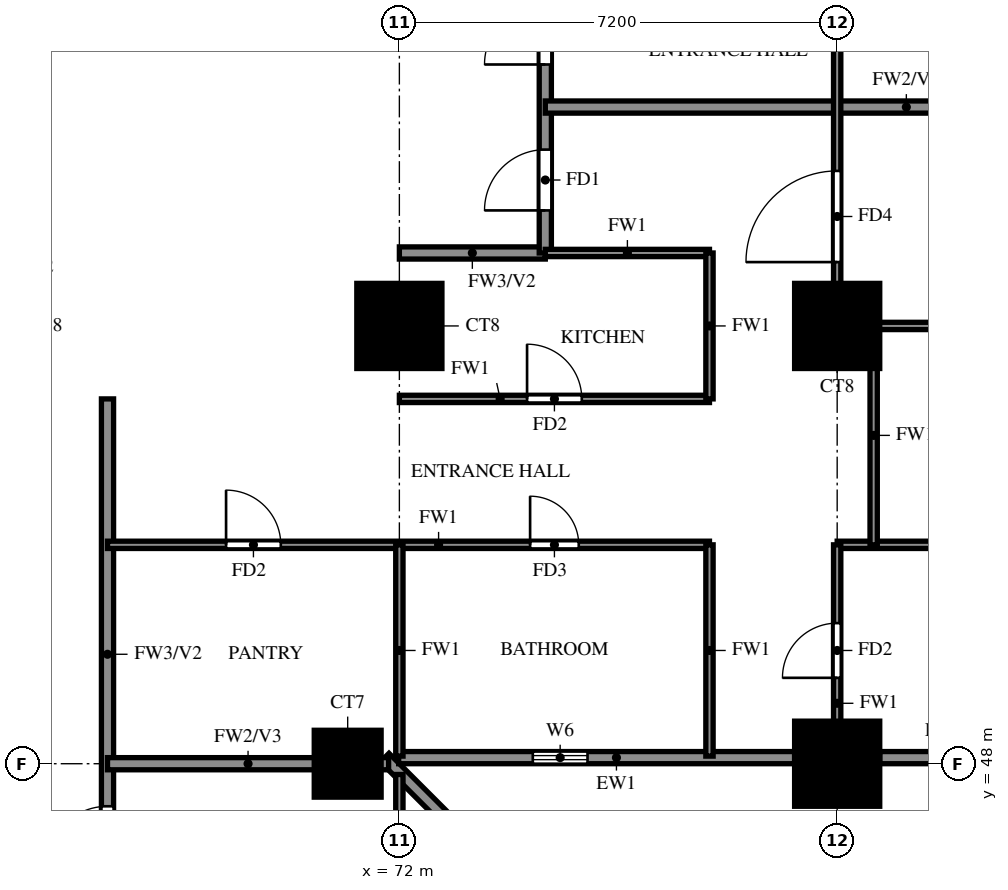
"""IFC4 building model, lengths in metres.
Left out: names, types, materials, properties, quantities, classifications, styles, units other than length and angle.
Written with IfcOpenShell. Run it as: python <this file> out.ifc"""

import sys

from ifc_helpers import new_model, si_unit, direction, frame, frame_2d, origin, origin_2d, place, context, subcontext, project, spatial, rectangle, extrude, source, transform, mapped, element, fill, save


model = new_model("IFC4")
c1 = context("Model", 3, precision=1e-05, world=origin(), true_north=direction((0.0, 1.0)))
c2 = subcontext(c1, "Body", "Model", "MODEL_VIEW")
j1 = project(units=[si_unit("LENGTHUNIT", "METRE"), si_unit("PLANEANGLEUNIT", "RADIAN")], contexts=[c1])
p1 = place(None, origin())
s1 = spatial("IfcSite", under=j1, at=p1, CompositionType="ELEMENT")
p2 = place(p1, origin())
s2 = spatial("IfcBuilding", under=s1, at=p2, CompositionType="ELEMENT")
p3 = place(p2, frame((0.0, 0.0, 30.5)))
s3 = spatial("IfcBuildingStorey", under=s2, at=p3, CompositionType="ELEMENT", Elevation=30.5)
m1 = source(origin(), c2, "Body", "SweptSolid", [
    extrude(rectangle(XDim=1.1, YDim=1.1, at=origin_2d()), origin(), (0.0, 0.0, 1.0), 3.18),
])
p4 = place(p3, frame((71.15, 48.0, 0.0), z_axis=(0.0, 0.0, 1.0), x_axis=(1.0, 0.0, 0.0)))
e1 = element("IfcColumn", 1, at=p4, inside=s3, PredefinedType="COLUMN", context=c2, shape_type="MappedRepresentation", body=[
    mapped(m1, transform((0.0, 0.0, 0.0))),
])
m2 = source(origin(), c2, "Body", "SweptSolid", [
    extrude(rectangle(XDim=1.4, YDim=1.4, at=origin_2d()), origin(), (0.0, 0.0, 1.0), 3.18),
])
for number, where, z_axis, x_axis in (
    (2, (79.2, 48.0, 0.0), (0.0, 0.0, 1.0), (1.0, 0.0, 0.0)),
    (3, (72.0, 55.2, 0.0), (0.0, 0.0, 1.0), (1.0, 0.0, 0.0)),
    (4, (79.2, 55.2, 0.0), (0.0, 0.0, 1.0), (1.0, 0.0, 0.0)),
):
    element("IfcColumn", number, at=place(p3, frame(where, z_axis=z_axis, x_axis=x_axis)), inside=s3, PredefinedType="COLUMN", context=c2, shape_type="MappedRepresentation", body=[
        mapped(m2, transform((0.0, 0.0, 0.0))),
    ])
p5 = place(p3, frame((78.74, 41.118, 0.0), z_axis=(0.0, 0.0, 1.0), x_axis=(-0.707106781187, 0.707106781187, 0.0)))
e5 = element("IfcWall", 5, at=p5, inside=s3, PredefinedType="SOLIDWALL", context=c2, shape_type="SweptSolid", body=[
    extrude(rectangle(XDim=9.874, YDim=0.2, at=frame_2d((4.937, 0.0))), origin(), (0.0, 0.0, 1.0), 3.18),
])
p6 = place(p3, frame((71.989, 48.1, 0.0), z_axis=(0.0, 0.0, 1.0), x_axis=(1.0, 0.0, 0.0)))
e6 = element("IfcWall", 6, at=p6, inside=s3, PredefinedType="SOLIDWALL", context=c2, shape_type="SweptSolid", body=[
    extrude(rectangle(XDim=6.511, YDim=0.2, at=frame_2d((3.256, 0.0))), origin(), (0.0, 0.0, 1.0), 3.18),
])
p7 = place(p6, frame((2.206, 0.0, 1.5)))
e7 = element("IfcOpeningElement", 7, at=p7, cuts=e6, PredefinedType="OPENING", context=c2, shape_type="SweptSolid", body=[
    extrude(rectangle(XDim=0.9, YDim=0.9, at=frame_2d((0.45, 0.45))), frame((0.0, 0.11, 0.0), z_axis=(0.0, -1.0, 0.0), x_axis=(1.0, 0.0, 0.0)), (0.0, 0.0, 1.0), 0.22),
])
p8 = place(p3, frame((79.9, 48.1, 0.0), z_axis=(0.0, 0.0, 1.0), x_axis=(1.0, 0.0, 0.0)))
e8 = element("IfcWall", 8, at=p8, inside=s3, PredefinedType="SOLIDWALL", context=c2, shape_type="SweptSolid", body=[
    extrude(rectangle(XDim=5.35, YDim=0.2, at=frame_2d((2.675, 0.0))), origin(), (0.0, 0.0, 1.0), 3.18),
])
p9 = place(p8, frame((1.475, 0.0, 0.6)))
e9 = element("IfcOpeningElement", 9, at=p9, cuts=e8, PredefinedType="OPENING", context=c2, shape_type="SweptSolid", body=[
    extrude(rectangle(XDim=2.4, YDim=2.4, at=frame_2d((1.2, 1.2))), frame((0.0, 0.11, 0.0), z_axis=(0.0, -1.0, 0.0), x_axis=(1.0, 0.0, 0.0)), (0.0, 0.0, 1.0), 0.22),
])
p10 = place(p3, frame((72.0, 56.4, 0.0), z_axis=(0.0, 0.0, 1.0), x_axis=(1.0, 0.0, 0.0)))
e10 = element("IfcWall", 10, at=p10, inside=s3, PredefinedType="SOLIDWALL", context=c2, shape_type="SweptSolid", body=[
    extrude(rectangle(XDim=2.4, YDim=0.2, at=frame_2d((1.2, 0.0))), origin(), (0.0, 0.0, 1.0), 3.18),
])
p11 = place(p3, frame((67.2, 45.6, 0.0), z_axis=(0.0, 0.0, 1.0), x_axis=(0.0, 1.0, 0.0)))
e11 = element("IfcWall", 11, at=p11, inside=s3, PredefinedType="SOLIDWALL", context=c2, shape_type="SweptSolid", body=[
    extrude(rectangle(XDim=8.4, YDim=0.2, at=frame_2d((4.2, 0.0))), origin(), (0.0, 0.0, 1.0), 3.18),
])
p12 = place(p11, frame((0.7, 0.0, 0.0)))
e12 = element("IfcOpeningElement", 12, at=p12, cuts=e11, PredefinedType="OPENING", context=c2, shape_type="SweptSolid", body=[
    extrude(rectangle(XDim=1.0, YDim=2.1, at=frame_2d((0.5, 1.05))), frame((0.0, 0.11, 0.0), z_axis=(0.0, -1.0, 0.0), x_axis=(1.0, 0.0, 0.0)), (0.0, 0.0, 1.0), 0.22),
])
p13 = place(p3, frame((74.4, 56.4, 0.0), z_axis=(0.0, 0.0, 1.0), x_axis=(0.0, 1.0, 0.0)))
e13 = element("IfcWall", 13, at=p13, inside=s3, PredefinedType="SOLIDWALL", context=c2, shape_type="SweptSolid", body=[
    extrude(rectangle(XDim=9.6, YDim=0.2, at=frame_2d((4.8, 0.0))), origin(), (0.0, 0.0, 1.0), 3.18),
])
p14 = place(p13, frame((0.7, 0.0, 0.0)))
e14 = element("IfcOpeningElement", 14, at=p14, cuts=e13, PredefinedType="OPENING", context=c2, shape_type="SweptSolid", body=[
    extrude(rectangle(XDim=1.0, YDim=2.1, at=frame_2d((0.5, 1.05))), frame((0.0, 0.11, 0.0), z_axis=(0.0, -1.0, 0.0), x_axis=(1.0, 0.0, 0.0)), (0.0, 0.0, 1.0), 0.22),
])
p15 = place(p13, frame((3.1, 0.0, 0.0)))
e15 = element("IfcOpeningElement", 15, at=p15, cuts=e13, PredefinedType="OPENING", context=c2, shape_type="SweptSolid", body=[
    extrude(rectangle(XDim=1.0, YDim=2.1, at=frame_2d((0.5, 1.05))), frame((0.0, 0.11, 0.0), z_axis=(0.0, -1.0, 0.0), x_axis=(1.0, 0.0, 0.0)), (0.0, 0.0, 1.0), 0.22),
])
p16 = place(p3, frame((67.2, 48.0, 0.0), z_axis=(0.0, 0.0, 1.0), x_axis=(1.0, 0.0, 0.0)))
e16 = element("IfcWall", 16, at=p16, inside=s3, PredefinedType="SOLIDWALL", context=c2, shape_type="SweptSolid", body=[
    extrude(rectangle(XDim=4.623, YDim=0.2, at=frame_2d((2.312, 0.0))), origin(), (0.0, 0.0, 1.0), 3.18),
])
p17 = place(p3, frame((74.4, 58.8, 0.0), z_axis=(0.0, 0.0, 1.0), x_axis=(1.0, 0.0, 0.0)))
e17 = element("IfcWall", 17, at=p17, inside=s3, PredefinedType="SOLIDWALL", context=c2, shape_type="SweptSolid", body=[
    extrude(rectangle(XDim=11.875, YDim=0.2, at=frame_2d((5.938, 0.0))), origin(), (0.0, 0.0, 1.0), 2.28),
])
p18 = place(p3, frame((67.2, 51.6, 0.0), z_axis=(0.0, 0.0, 1.0), x_axis=(1.0, 0.0, 0.0)))
e18 = element("IfcWall", 18, at=p18, inside=s3, PredefinedType="PARTITIONING", context=c2, shape_type="SweptSolid", body=[
    extrude(rectangle(XDim=9.9, YDim=0.12, at=frame_2d((4.95, 0.0))), origin(), (0.0, 0.0, 1.0), 3.18),
])
p19 = place(p18, frame((6.95, 0.0, 0.0)))
e19 = element("IfcOpeningElement", 19, at=p19, cuts=e18, PredefinedType="OPENING", context=c2, shape_type="SweptSolid", body=[
    extrude(rectangle(XDim=0.8, YDim=2.1, at=frame_2d((0.4, 1.05))), frame((0.0, 0.07, 0.0), z_axis=(0.0, -1.0, 0.0), x_axis=(1.0, 0.0, 0.0)), (0.0, 0.0, 1.0), 0.14),
])
p20 = place(p18, frame((1.95, 0.0, 0.0)))
e20 = element("IfcOpeningElement", 20, at=p20, cuts=e18, PredefinedType="OPENING", context=c2, shape_type="SweptSolid", body=[
    extrude(rectangle(XDim=0.9, YDim=2.1, at=frame_2d((0.45, 1.05))), frame((0.0, 0.07, 0.0), z_axis=(0.0, -1.0, 0.0), x_axis=(1.0, 0.0, 0.0)), (0.0, 0.0, 1.0), 0.14),
])
p21 = place(p3, frame((79.2, 51.6, 0.0), z_axis=(0.0, 0.0, 1.0), x_axis=(1.0, 0.0, 0.0)))
e21 = element("IfcWall", 21, at=p21, inside=s3, PredefinedType="PARTITIONING", context=c2, shape_type="SweptSolid", body=[
    extrude(rectangle(XDim=7.075, YDim=0.12, at=frame_2d((3.538, 0.0))), origin(), (0.0, 0.0, 1.0), 2.28),
])
p22 = place(p21, frame((3.438, 0.0, 0.0)))
e22 = element("IfcOpeningElement", 22, at=p22, cuts=e21, PredefinedType="OPENING", context=c2, shape_type="SweptSolid", body=[
    extrude(rectangle(XDim=0.8, YDim=2.1, at=frame_2d((0.4, 1.05))), frame((0.0, 0.07, 0.0), z_axis=(0.0, -1.0, 0.0), x_axis=(1.0, 0.0, 0.0)), (0.0, 0.0, 1.0), 0.14),
])
p23 = place(p3, frame((72.0, 54.0, 0.0), z_axis=(0.0, 0.0, 1.0), x_axis=(1.0, 0.0, 0.0)))
e23 = element("IfcWall", 23, at=p23, inside=s3, PredefinedType="PARTITIONING", context=c2, shape_type="SweptSolid", body=[
    extrude(rectangle(XDim=5.1, YDim=0.12, at=frame_2d((2.55, 0.0))), origin(), (0.0, 0.0, 1.0), 3.18),
])
p24 = place(p23, frame((2.1, 0.0, 0.0)))
e24 = element("IfcOpeningElement", 24, at=p24, cuts=e23, PredefinedType="OPENING", context=c2, shape_type="SweptSolid", body=[
    extrude(rectangle(XDim=0.9, YDim=2.1, at=frame_2d((0.45, 1.05))), frame((0.0, 0.07, 0.0), z_axis=(0.0, -1.0, 0.0), x_axis=(1.0, 0.0, 0.0)), (0.0, 0.0, 1.0), 0.14),
])
p25 = place(p3, frame((79.2, 55.2, 0.0), z_axis=(0.0, 0.0, 1.0), x_axis=(1.0, 0.0, 0.0)))
e25 = element("IfcWall", 25, at=p25, inside=s3, PredefinedType="PARTITIONING", context=c2, shape_type="SweptSolid", body=[
    extrude(rectangle(XDim=7.075, YDim=0.12, at=frame_2d((3.538, 0.0))), origin(), (0.0, 0.0, 1.0), 3.18),
])
p26 = place(p3, frame((74.4, 56.4, 0.0), z_axis=(0.0, 0.0, 1.0), x_axis=(1.0, 0.0, 0.0)))
e26 = element("IfcWall", 26, at=p26, inside=s3, PredefinedType="PARTITIONING", context=c2, shape_type="SweptSolid", body=[
    extrude(rectangle(XDim=2.7, YDim=0.12, at=frame_2d((1.35, 0.0))), origin(), (0.0, 0.0, 1.0), 3.18),
])
p27 = place(p3, frame((72.0, 33.725, 0.0), z_axis=(0.0, 0.0, 1.0), x_axis=(0.0, 1.0, 0.0)))
e27 = element("IfcWall", 27, at=p27, inside=s3, PredefinedType="PARTITIONING", context=c2, shape_type="SweptSolid", body=[
    extrude(rectangle(XDim=14.098, YDim=0.12, at=frame_2d((7.049, 0.0))), origin(), (0.0, 0.0, 1.0), 2.28),
])
p28 = place(p27, frame((10.075, 0.0, 0.0)))
e28 = element("IfcOpeningElement", 28, at=p28, cuts=e27, PredefinedType="OPENING", context=c2, shape_type="SweptSolid", body=[
    extrude(rectangle(XDim=0.9, YDim=2.1, at=frame_2d((0.45, 1.05))), frame((0.0, 0.07, 0.0), z_axis=(0.0, -1.0, 0.0), x_axis=(1.0, 0.0, 0.0)), (0.0, 0.0, 1.0), 0.14),
])
for number, where, z_axis, x_axis in (
    (29, (72.0, 48.125, 0.0), (0.0, 0.0, 1.0), (0.0, 1.0, 0.0)),
    (30, (77.1, 48.125, 0.0), (0.0, 0.0, 1.0), (0.0, 1.0, 0.0)),
):
    element("IfcWall", number, at=place(p3, frame(where, z_axis=z_axis, x_axis=x_axis)), inside=s3, PredefinedType="PARTITIONING", context=c2, shape_type="SweptSolid", body=[
        extrude(rectangle(XDim=3.475, YDim=0.12, at=frame_2d((1.738, 0.0))), origin(), (0.0, 0.0, 1.0), 3.18),
    ])
p29 = place(p3, frame((77.1, 54.0, 0.0), z_axis=(0.0, 0.0, 1.0), x_axis=(0.0, 1.0, 0.0)))
e31 = element("IfcWall", 31, at=p29, inside=s3, PredefinedType="PARTITIONING", context=c2, shape_type="SweptSolid", body=[
    extrude(rectangle(XDim=2.4, YDim=0.12, at=frame_2d((1.2, 0.0))), origin(), (0.0, 0.0, 1.0), 3.18),
])
p30 = place(p3, frame((79.2, 48.125, 0.0), z_axis=(0.0, 0.0, 1.0), x_axis=(0.0, 1.0, 0.0)))
e32 = element("IfcWall", 32, at=p30, inside=s3, PredefinedType="PARTITIONING", context=c2, shape_type="SweptSolid", body=[
    extrude(rectangle(XDim=3.475, YDim=0.12, at=frame_2d((1.738, 0.0))), origin(), (0.0, 0.0, 1.0), 3.18),
])
p31 = place(p30, frame((1.288, 0.0, 0.0)))
e33 = element("IfcOpeningElement", 33, at=p31, cuts=e32, PredefinedType="OPENING", context=c2, shape_type="SweptSolid", body=[
    extrude(rectangle(XDim=0.9, YDim=2.1, at=frame_2d((0.45, 1.05))), frame((0.0, 0.07, 0.0), z_axis=(0.0, -1.0, 0.0), x_axis=(1.0, 0.0, 0.0)), (0.0, 0.0, 1.0), 0.14),
])
p32 = place(p3, frame((79.2, 55.2, 0.0), z_axis=(0.0, 0.0, 1.0), x_axis=(0.0, 1.0, 0.0)))
e34 = element("IfcWall", 34, at=p32, inside=s3, PredefinedType="PARTITIONING", context=c2, shape_type="SweptSolid", body=[
    extrude(rectangle(XDim=18.0, YDim=0.12, at=frame_2d((9.0, 0.0))), origin(), (0.0, 0.0, 1.0), 3.18),
])
p33 = place(p32, frame((1.05, 0.0, 0.0)))
e35 = element("IfcOpeningElement", 35, at=p33, cuts=e34, PredefinedType="OPENING", context=c2, shape_type="SweptSolid", body=[
    extrude(rectangle(XDim=1.5, YDim=2.1, at=frame_2d((0.75, 1.05))), frame((0.0, 0.07, 0.0), z_axis=(0.0, -1.0, 0.0), x_axis=(1.0, 0.0, 0.0)), (0.0, 0.0, 1.0), 0.14),
])
p34 = place(p32, frame((4.95, 0.0, 0.0)))
e36 = element("IfcOpeningElement", 36, at=p34, cuts=e34, PredefinedType="OPENING", context=c2, shape_type="SweptSolid", body=[
    extrude(rectangle(XDim=0.9, YDim=2.1, at=frame_2d((0.45, 1.05))), frame((0.0, 0.07, 0.0), z_axis=(0.0, -1.0, 0.0), x_axis=(1.0, 0.0, 0.0)), (0.0, 0.0, 1.0), 0.14),
])
p35 = place(p32, frame((8.55, 0.0, 0.0)))
e37 = element("IfcOpeningElement", 37, at=p35, cuts=e34, PredefinedType="OPENING", context=c2, shape_type="SweptSolid", body=[
    extrude(rectangle(XDim=0.9, YDim=2.1, at=frame_2d((0.45, 1.05))), frame((0.0, 0.07, 0.0), z_axis=(0.0, -1.0, 0.0), x_axis=(1.0, 0.0, 0.0)), (0.0, 0.0, 1.0), 0.14),
])
p36 = place(p32, frame((12.15, 0.0, 0.0)))
e38 = element("IfcOpeningElement", 38, at=p36, cuts=e34, PredefinedType="OPENING", context=c2, shape_type="SweptSolid", body=[
    extrude(rectangle(XDim=0.9, YDim=2.1, at=frame_2d((0.45, 1.05))), frame((0.0, 0.07, 0.0), z_axis=(0.0, -1.0, 0.0), x_axis=(1.0, 0.0, 0.0)), (0.0, 0.0, 1.0), 0.14),
])
p37 = place(p32, frame((15.75, 0.0, 0.0)))
e39 = element("IfcOpeningElement", 39, at=p37, cuts=e34, PredefinedType="OPENING", context=c2, shape_type="SweptSolid", body=[
    extrude(rectangle(XDim=0.9, YDim=2.1, at=frame_2d((0.45, 1.05))), frame((0.0, 0.07, 0.0), z_axis=(0.0, -1.0, 0.0), x_axis=(1.0, 0.0, 0.0)), (0.0, 0.0, 1.0), 0.14),
])
p38 = place(p3, frame((79.8, 51.6, 0.0), z_axis=(0.0, 0.0, 1.0), x_axis=(0.0, 1.0, 0.0)))
e40 = element("IfcWall", 40, at=p38, inside=s3, PredefinedType="PARTITIONING", context=c2, shape_type="SweptSolid", body=[
    extrude(rectangle(XDim=3.6, YDim=0.12, at=frame_2d((1.8, 0.0))), origin(), (0.0, 0.0, 1.0), 3.18),
])
p39 = place(p7, origin())
e41 = element("IfcWindow", 41, at=p39, inside=s3, PartitioningType="SINGLE_PANEL", PredefinedType="WINDOW", context=c2, shape_type="SweptSolid", body=[
    extrude(rectangle(XDim=0.9, YDim=0.9, at=frame_2d((0.45, 0.45))), frame((0.0, 0.03, 0.0), z_axis=(0.0, -1.0, 0.0), x_axis=(1.0, 0.0, 0.0)), (0.0, 0.0, 1.0), 0.06),
])
fill(e7, e41)
p40 = place(p14, origin())
e42 = element("IfcDoor", 42, at=p40, inside=s3, OperationType="SINGLE_SWING_LEFT", PredefinedType="DOOR", context=c2, shape_type="SweptSolid", body=[
    extrude(rectangle(XDim=1.0, YDim=2.1, at=frame_2d((0.5, 1.05))), frame((0.0, 0.025, 0.0), z_axis=(0.0, -1.0, 0.0), x_axis=(1.0, 0.0, 0.0)), (0.0, 0.0, 1.0), 0.05),
])
fill(e14, e42)
p41 = place(p31, origin())
e43 = element("IfcDoor", 43, at=p41, inside=s3, OperationType="SINGLE_SWING_RIGHT", PredefinedType="DOOR", context=c2, shape_type="SweptSolid", body=[
    extrude(rectangle(XDim=0.9, YDim=2.1, at=frame_2d((0.45, 1.05))), frame((0.0, 0.025, 0.0), z_axis=(0.0, -1.0, 0.0), x_axis=(1.0, 0.0, 0.0)), (0.0, 0.0, 1.0), 0.05),
])
fill(e33, e43)
p42 = place(p33, origin())
e44 = element("IfcDoor", 44, at=p42, inside=s3, OperationType="SINGLE_SWING_LEFT", PredefinedType="DOOR", context=c2, shape_type="SweptSolid", body=[
    extrude(rectangle(XDim=1.5, YDim=2.1, at=frame_2d((0.75, 1.05))), frame((0.0, 0.025, 0.0), z_axis=(0.0, -1.0, 0.0), x_axis=(1.0, 0.0, 0.0)), (0.0, 0.0, 1.0), 0.05),
])
fill(e35, e44)
p43 = place(p19, origin())
e45 = element("IfcDoor", 45, at=p43, inside=s3, OperationType="SINGLE_SWING_RIGHT", PredefinedType="DOOR", context=c2, shape_type="SweptSolid", body=[
    extrude(rectangle(XDim=0.8, YDim=2.1, at=frame_2d((0.4, 1.05))), frame((0.0, 0.025, 0.0), z_axis=(0.0, -1.0, 0.0), x_axis=(1.0, 0.0, 0.0)), (0.0, 0.0, 1.0), 0.05),
])
fill(e19, e45)
p44 = place(p24, origin())
e46 = element("IfcDoor", 46, at=p44, inside=s3, OperationType="SINGLE_SWING_LEFT", PredefinedType="DOOR", context=c2, shape_type="SweptSolid", body=[
    extrude(rectangle(XDim=0.9, YDim=2.1, at=frame_2d((0.45, 1.05))), frame((0.0, 0.025, 0.0), z_axis=(0.0, -1.0, 0.0), x_axis=(1.0, 0.0, 0.0)), (0.0, 0.0, 1.0), 0.05),
])
fill(e24, e46)
p45 = place(p20, origin())
e47 = element("IfcDoor", 47, at=p45, inside=s3, OperationType="SINGLE_SWING_LEFT", PredefinedType="DOOR", context=c2, shape_type="SweptSolid", body=[
    extrude(rectangle(XDim=0.9, YDim=2.1, at=frame_2d((0.45, 1.05))), frame((0.0, 0.025, 0.0), z_axis=(0.0, -1.0, 0.0), x_axis=(1.0, 0.0, 0.0)), (0.0, 0.0, 1.0), 0.05),
])
fill(e20, e47)
p46 = place(p15, origin())
e48 = element("IfcDoor", 48, at=p46, inside=s3, OperationType="SINGLE_SWING_LEFT", PredefinedType="DOOR", context=c2, shape_type="SweptSolid", body=[
    extrude(rectangle(XDim=1.0, YDim=2.1, at=frame_2d((0.5, 1.05))), frame((0.0, 0.025, 0.0), z_axis=(0.0, -1.0, 0.0), x_axis=(1.0, 0.0, 0.0)), (0.0, 0.0, 1.0), 0.05),
])
fill(e15, e48)
p47 = place(p12, origin())
e49 = element("IfcDoor", 49, at=p47, inside=s3, OperationType="SINGLE_SWING_LEFT", PredefinedType="DOOR", context=c2, shape_type="SweptSolid", body=[
    extrude(rectangle(XDim=1.0, YDim=2.1, at=frame_2d((0.5, 1.05))), frame((0.0, 0.025, 0.0), z_axis=(0.0, -1.0, 0.0), x_axis=(1.0, 0.0, 0.0)), (0.0, 0.0, 1.0), 0.05),
])
fill(e12, e49)
save(model, sys.argv[1])
